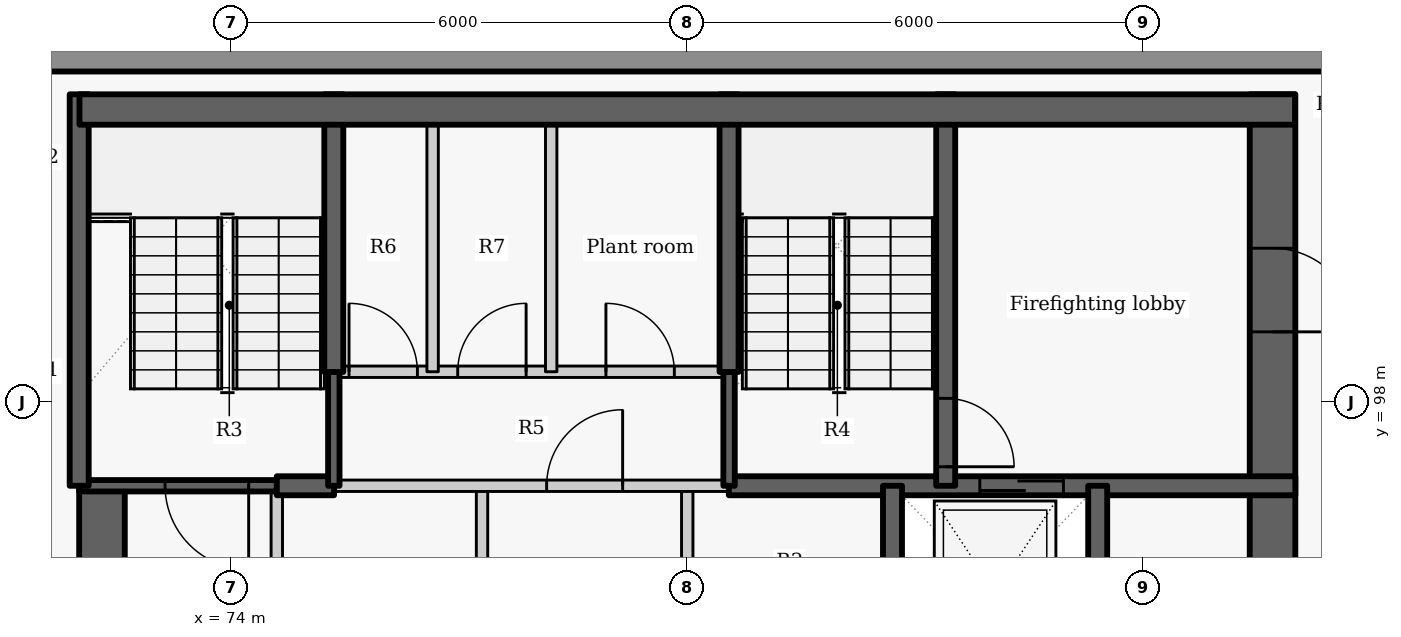
"""IFC4 building model, lengths in metres.
Left out: names, types, materials, properties, quantities, classifications, styles, units other than length and angle.
Written with IfcOpenShell. Run it as: python <this file> out.ifc"""

import sys

from ifc_helpers import new_model, si_unit, direction, frame, frame_2d, origin, place, context, subcontext, project, spatial, rectangle, extrude, element, fill, save


model = new_model("IFC4")
c1 = context("Model", 3, precision=1e-05, world=origin(), true_north=direction((0.0, 1.0)))
c2 = subcontext(c1, "Body", "Model", "MODEL_VIEW")
j1 = project(units=[si_unit("LENGTHUNIT", "METRE"), si_unit("PLANEANGLEUNIT", "RADIAN")], contexts=[c1])
p1 = place(None, origin())
s1 = spatial("IfcSite", under=j1, at=p1, CompositionType="ELEMENT")
p2 = place(p1, origin())
s2 = spatial("IfcBuilding", under=s1, at=p2, CompositionType="ELEMENT")
p3 = place(p2, frame((0.0, 0.0, 276.0)))
s3 = spatial("IfcBuildingStorey", under=s2, at=p3, CompositionType="ELEMENT", Elevation=276.0)
p4 = place(p3, frame((89.549, 102.5, 0.0), z_axis=(0.0, 0.0, 1.0), x_axis=(-1.0, 0.0, 0.0)))
e1 = element("IfcWall", 1, at=p4, inside=s3, PredefinedType="SOLIDWALL", context=c2, shape_type="SweptSolid", body=[
    extrude(rectangle(XDim=19.134, YDim=0.3, at=frame_2d((9.567, 0.0))), origin(), (0.0, 0.0, 1.0), 2.725),
])
p5 = place(p3, frame((74.6, 94.1, 0.0), z_axis=(0.0, 0.0, 1.0), x_axis=(0.0, 1.0, 0.0)))
e2 = element("IfcWall", 2, at=p5, inside=s3, PredefinedType="PARTITIONING", context=c2, shape_type="SweptSolid", body=[
    extrude(rectangle(XDim=2.8, YDim=0.15, at=frame_2d((1.4, 0.0))), origin(), (0.0, 0.0, 1.0), 3.325),
])
p6 = place(p3, frame((72.3, 87.8, -0.275), z_axis=(0.0, 0.0, 1.0), x_axis=(0.0, 1.0, 0.0)))
e3 = element("IfcWall", 3, at=p6, inside=s3, PredefinedType="SHEAR", context=c2, shape_type="SweptSolid", body=[
    extrude(rectangle(XDim=9.1, YDim=0.6, at=frame_2d((4.55, 0.0))), origin(), (0.0, 0.0, 1.0), 3.6),
])
p7 = place(p6, frame((3.85, 0.0, 0.275)))
e4 = element("IfcOpeningElement", 4, at=p7, cuts=e3, PredefinedType="OPENING", context=c2, shape_type="SweptSolid", body=[
    extrude(rectangle(XDim=1.5, YDim=2.1, at=frame_2d((0.75, 1.05))), frame((0.0, 0.31, 0.0), z_axis=(0.0, -1.0, 0.0), x_axis=(1.0, 0.0, 0.0)), (0.0, 0.0, 1.0), 0.62),
])
for number, where, z_axis, x_axis in (
    (5, (77.3, 94.1, 0.0), (0.0, 0.0, 1.0), (0.0, 1.0, 0.0)),
    (6, (80.0, 94.1, 0.0), (0.0, 0.0, 1.0), (0.0, 1.0, 0.0)),
):
    element("IfcWall", number, at=place(p3, frame(where, z_axis=z_axis, x_axis=x_axis)), inside=s3, PredefinedType="PARTITIONING", context=c2, shape_type="SweptSolid", body=[
        extrude(rectangle(XDim=2.8, YDim=0.15, at=frame_2d((1.4, 0.0))), origin(), (0.0, 0.0, 1.0), 3.325),
    ])
p8 = place(p3, frame((87.7, 102.05, -0.275), z_axis=(0.0, 0.0, 1.0), x_axis=(0.0, -1.0, 0.0)))
e7 = element("IfcWall", 7, at=p8, inside=s3, PredefinedType="SHEAR", context=c2, shape_type="SweptSolid", body=[
    extrude(rectangle(XDim=11.35, YDim=0.6, at=frame_2d((5.675, 0.0))), origin(), (0.0, 0.0, 1.0), 3.6),
])
p9 = place(p8, frame((8.9, 0.0, 0.275)))
e8 = element("IfcOpeningElement", 8, at=p9, cuts=e7, PredefinedType="OPENING", context=c2, shape_type="SweptSolid", body=[
    extrude(rectangle(XDim=1.5, YDim=2.1, at=frame_2d((0.75, 1.05))), frame((0.0, 0.31, 0.0), z_axis=(0.0, -1.0, 0.0), x_axis=(1.0, 0.0, 0.0)), (0.0, 0.0, 1.0), 0.62),
])
p10 = place(p8, frame((2.025, 0.0, 0.275)))
e9 = element("IfcOpeningElement", 9, at=p10, cuts=e7, PredefinedType="OPENING", context=c2, shape_type="SweptSolid", body=[
    extrude(rectangle(XDim=1.1, YDim=2.1, at=frame_2d((0.55, 1.05))), frame((0.0, 0.31, 0.0), z_axis=(0.0, -1.0, 0.0), x_axis=(1.0, 0.0, 0.0)), (0.0, 0.0, 1.0), 0.62),
])
p11 = place(p3, frame((74.6, 96.9, -0.275), z_axis=(0.0, 0.0, 1.0), x_axis=(-1.0, 0.0, 0.0)))
e10 = element("IfcWall", 10, at=p11, inside=s3, PredefinedType="SHEAR", context=c2, shape_type="SweptSolid", body=[
    extrude(rectangle(XDim=2.6, YDim=0.15, at=frame_2d((1.3, 0.0))), origin(), (0.0, 0.0, 1.0), 3.6),
])
p12 = place(p11, frame((0.37, 0.0, 0.275)))
e11 = element("IfcOpeningElement", 11, at=p12, cuts=e10, PredefinedType="OPENING", context=c2, shape_type="SweptSolid", body=[
    extrude(rectangle(XDim=1.1, YDim=2.1, at=frame_2d((0.55, 1.05))), frame((0.0, 0.085, 0.0), z_axis=(0.0, -1.0, 0.0), x_axis=(1.0, 0.0, 0.0)), (0.0, 0.0, 1.0), 0.17),
])
p13 = place(p3, frame((74.6, 96.9, -0.275), z_axis=(0.0, 0.0, 1.0), x_axis=(1.0, 0.0, 0.0)))
e12 = element("IfcWall", 12, at=p13, inside=s3, PredefinedType="SHEAR", context=c2, shape_type="SweptSolid", body=[
    extrude(rectangle(XDim=0.753, YDim=0.25, at=frame_2d((0.376, 0.0))), origin(), (0.0, 0.0, 1.0), 3.6),
])
p14 = place(p3, frame((80.547, 96.9, -0.275), z_axis=(0.0, 0.0, 1.0), x_axis=(1.0, 0.0, 0.0)))
e13 = element("IfcWall", 13, at=p14, inside=s3, PredefinedType="SHEAR", context=c2, shape_type="SweptSolid", body=[
    extrude(rectangle(XDim=7.453, YDim=0.25, at=frame_2d((3.727, 0.0))), origin(), (0.0, 0.0, 1.0), 3.6),
])
p15 = place(p14, frame((3.302, 0.0, 0.275)))
e14 = element("IfcOpeningElement", 14, at=p15, cuts=e13, PredefinedType="OPENING", context=c2, shape_type="SweptSolid", body=[
    extrude(rectangle(XDim=1.1, YDim=2.1, at=frame_2d((0.55, 1.05))), frame((0.0, 0.135, 0.0), z_axis=(0.0, -1.0, 0.0), x_axis=(1.0, 0.0, 0.0)), (0.0, 0.0, 1.0), 0.27),
])
p16 = place(p3, frame((75.347, 96.9, 0.0), z_axis=(0.0, 0.0, 1.0), x_axis=(1.0, 0.0, 0.0)))
e15 = element("IfcWall", 15, at=p16, inside=s3, PredefinedType="PARTITIONING", context=c2, shape_type="SweptSolid", body=[
    extrude(rectangle(XDim=5.206, YDim=0.15, at=frame_2d((2.603, 0.0))), origin(), (0.0, 0.0, 1.0), 3.325),
])
p17 = place(p16, frame((2.803, 0.0, 0.0)))
e16 = element("IfcOpeningElement", 16, at=p17, cuts=e15, PredefinedType="OPENING", context=c2, shape_type="SweptSolid", body=[
    extrude(rectangle(XDim=1.0, YDim=2.1, at=frame_2d((0.5, 1.05))), frame((0.0, 0.085, 0.0), z_axis=(0.0, -1.0, 0.0), x_axis=(1.0, 0.0, 0.0)), (0.0, 0.0, 1.0), 0.17),
])
for number, where, z_axis, x_axis in (
    (17, (82.7, 94.1, -0.275), (0.0, 0.0, 1.0), (0.0, 1.0, 0.0)),
    (18, (85.4, 94.1, -0.275), (0.0, 0.0, 1.0), (0.0, 1.0, 0.0)),
):
    element("IfcWall", number, at=place(p3, frame(where, z_axis=z_axis, x_axis=x_axis)), inside=s3, PredefinedType="SHEAR", context=c2, shape_type="SweptSolid", body=[
        extrude(rectangle(XDim=2.8, YDim=0.25, at=frame_2d((1.4, 0.0))), origin(), (0.0, 0.0, 1.0), 3.6),
    ])
p18 = place(p3, frame((75.35, 96.9, -0.275), z_axis=(0.0, 0.0, 1.0), x_axis=(0.0, 1.0, 0.0)))
e19 = element("IfcWall", 19, at=p18, inside=s3, PredefinedType="SHEAR", context=c2, shape_type="SweptSolid", body=[
    extrude(rectangle(XDim=1.503, YDim=0.15, at=frame_2d((0.751, 0.0))), origin(), (0.0, 0.0, 1.0), 3.6),
])
p19 = place(p3, frame((75.35, 98.397, -0.275), z_axis=(0.0, 0.0, 1.0), x_axis=(0.0, 1.0, 0.0)))
e20 = element("IfcWall", 20, at=p19, inside=s3, PredefinedType="SHEAR", context=c2, shape_type="SweptSolid", body=[
    extrude(rectangle(XDim=3.653, YDim=0.25, at=frame_2d((1.827, 0.0))), origin(), (0.0, 0.0, 1.0), 3.6),
])
p20 = place(p3, frame((72.0, 96.9, -0.275), z_axis=(0.0, 0.0, 1.0), x_axis=(0.0, 1.0, 0.0)))
e21 = element("IfcWall", 21, at=p20, inside=s3, PredefinedType="SHEAR", context=c2, shape_type="SweptSolid", body=[
    extrude(rectangle(XDim=5.15, YDim=0.25, at=frame_2d((2.575, 0.0))), origin(), (0.0, 0.0, 1.0), 3.6),
])
p21 = place(p3, frame((83.4, 102.05, -0.275), z_axis=(0.0, 0.0, 1.0), x_axis=(0.0, -1.0, 0.0)))
e22 = element("IfcWall", 22, at=p21, inside=s3, PredefinedType="SHEAR", context=c2, shape_type="SweptSolid", body=[
    extrude(rectangle(XDim=5.15, YDim=0.25, at=frame_2d((2.575, 0.0))), origin(), (0.0, 0.0, 1.0), 3.6),
])
p22 = place(p21, frame((4.0, 0.0, 0.275)))
e23 = element("IfcOpeningElement", 23, at=p22, cuts=e22, PredefinedType="OPENING", context=c2, shape_type="SweptSolid", body=[
    extrude(rectangle(XDim=0.9, YDim=2.1, at=frame_2d((0.45, 1.05))), frame((0.0, 0.135, 0.0), z_axis=(0.0, -1.0, 0.0), x_axis=(1.0, 0.0, 0.0)), (0.0, 0.0, 1.0), 0.27),
])
p23 = place(p3, frame((80.55, 96.9, -0.275), z_axis=(0.0, 0.0, 1.0), x_axis=(0.0, 1.0, 0.0)))
e24 = element("IfcWall", 24, at=p23, inside=s3, PredefinedType="SHEAR", context=c2, shape_type="SweptSolid", body=[
    extrude(rectangle(XDim=1.503, YDim=0.15, at=frame_2d((0.751, 0.0))), origin(), (0.0, 0.0, 1.0), 3.6),
])
p24 = place(p3, frame((80.55, 98.397, -0.275), z_axis=(0.0, 0.0, 1.0), x_axis=(0.0, 1.0, 0.0)))
e25 = element("IfcWall", 25, at=p24, inside=s3, PredefinedType="SHEAR", context=c2, shape_type="SweptSolid", body=[
    extrude(rectangle(XDim=3.653, YDim=0.25, at=frame_2d((1.827, 0.0))), origin(), (0.0, 0.0, 1.0), 3.6),
])
p25 = place(p3, frame((75.35, 98.4, 0.0), z_axis=(0.0, 0.0, 1.0), x_axis=(1.0, 0.0, 0.0)))
e26 = element("IfcWall", 26, at=p25, inside=s3, PredefinedType="PARTITIONING", context=c2, shape_type="SweptSolid", body=[
    extrude(rectangle(XDim=5.2, YDim=0.15, at=frame_2d((2.6, 0.0))), origin(), (0.0, 0.0, 1.0), 3.325),
])
p26 = place(p25, frame((0.2, 0.0, 0.0)))
e27 = element("IfcOpeningElement", 27, at=p26, cuts=e26, PredefinedType="OPENING", context=c2, shape_type="SweptSolid", body=[
    extrude(rectangle(XDim=0.9, YDim=2.1, at=frame_2d((0.45, 1.05))), frame((0.0, 0.085, 0.0), z_axis=(0.0, -1.0, 0.0), x_axis=(1.0, 0.0, 0.0)), (0.0, 0.0, 1.0), 0.17),
])
p27 = place(p25, frame((1.63, 0.0, 0.0)))
e28 = element("IfcOpeningElement", 28, at=p27, cuts=e26, PredefinedType="OPENING", context=c2, shape_type="SweptSolid", body=[
    extrude(rectangle(XDim=0.9, YDim=2.1, at=frame_2d((0.45, 1.05))), frame((0.0, 0.085, 0.0), z_axis=(0.0, -1.0, 0.0), x_axis=(1.0, 0.0, 0.0)), (0.0, 0.0, 1.0), 0.17),
])
p28 = place(p25, frame((3.58, 0.0, 0.0)))
e29 = element("IfcOpeningElement", 29, at=p28, cuts=e26, PredefinedType="OPENING", context=c2, shape_type="SweptSolid", body=[
    extrude(rectangle(XDim=0.9, YDim=2.1, at=frame_2d((0.45, 1.05))), frame((0.0, 0.085, 0.0), z_axis=(0.0, -1.0, 0.0), x_axis=(1.0, 0.0, 0.0)), (0.0, 0.0, 1.0), 0.17),
])
for number, where, z_axis, x_axis in (
    (30, (76.65, 98.4, 0.0), (0.0, 0.0, 1.0), (0.0, 1.0, 0.0)),
    (31, (78.21, 98.4, 0.0), (0.0, 0.0, 1.0), (0.0, 1.0, 0.0)),
):
    element("IfcWall", number, at=place(p3, frame(where, z_axis=z_axis, x_axis=x_axis)), inside=s3, PredefinedType="PARTITIONING", context=c2, shape_type="SweptSolid", body=[
        extrude(rectangle(XDim=3.65, YDim=0.15, at=frame_2d((1.825, 0.0))), origin(), (0.0, 0.0, 1.0), 3.325),
    ])
p29 = place(p3, frame((72.004, 101.85, -0.275), z_axis=(0.0, 0.0, 1.0), x_axis=(1.0, 0.0, 0.0)))
e32 = element("IfcWall", 32, at=p29, inside=s3, PredefinedType="SHEAR", context=c2, shape_type="SweptSolid", body=[
    extrude(rectangle(XDim=15.992, YDim=0.4, at=frame_2d((7.996, 0.0))), origin(), (0.0, 0.0, 1.0), 3.6),
])
p30 = place(p15, origin())
e33 = element("IfcDoor", 33, at=p30, inside=s3, OperationType="SLIDING_TO_LEFT", PredefinedType="DOOR", context=c2, shape_type="SweptSolid", body=[
    extrude(rectangle(XDim=1.1, YDim=2.1, at=frame_2d((0.55, 1.05))), frame((0.0, 0.025, 0.0), z_axis=(0.0, -1.0, 0.0), x_axis=(1.0, 0.0, 0.0)), (0.0, 0.0, 1.0), 0.05),
])
fill(e14, e33)
p31 = place(p17, origin())
e34 = element("IfcDoor", 34, at=p31, inside=s3, OperationType="SINGLE_SWING_RIGHT", PredefinedType="DOOR", context=c2, shape_type="SweptSolid", body=[
    extrude(rectangle(XDim=1.0, YDim=2.1, at=frame_2d((0.5, 1.05))), frame((0.0, 0.025, 0.0), z_axis=(0.0, -1.0, 0.0), x_axis=(1.0, 0.0, 0.0)), (0.0, 0.0, 1.0), 0.05),
])
fill(e16, e34)
p32 = place(p26, origin())
e35 = element("IfcDoor", 35, at=p32, inside=s3, OperationType="SINGLE_SWING_LEFT", PredefinedType="DOOR", context=c2, shape_type="SweptSolid", body=[
    extrude(rectangle(XDim=0.9, YDim=2.1, at=frame_2d((0.45, 1.05))), frame((0.0, 0.025, 0.0), z_axis=(0.0, -1.0, 0.0), x_axis=(1.0, 0.0, 0.0)), (0.0, 0.0, 1.0), 0.05),
])
fill(e27, e35)
p33 = place(p27, origin())
e36 = element("IfcDoor", 36, at=p33, inside=s3, OperationType="SINGLE_SWING_RIGHT", PredefinedType="DOOR", context=c2, shape_type="SweptSolid", body=[
    extrude(rectangle(XDim=0.9, YDim=2.1, at=frame_2d((0.45, 1.05))), frame((0.0, 0.025, 0.0), z_axis=(0.0, -1.0, 0.0), x_axis=(1.0, 0.0, 0.0)), (0.0, 0.0, 1.0), 0.05),
])
fill(e28, e36)
p34 = place(p28, origin())
e37 = element("IfcDoor", 37, at=p34, inside=s3, OperationType="SINGLE_SWING_LEFT", PredefinedType="DOOR", context=c2, shape_type="SweptSolid", body=[
    extrude(rectangle(XDim=0.9, YDim=2.1, at=frame_2d((0.45, 1.05))), frame((0.0, 0.025, 0.0), z_axis=(0.0, -1.0, 0.0), x_axis=(1.0, 0.0, 0.0)), (0.0, 0.0, 1.0), 0.05),
])
fill(e29, e37)
p35 = place(p12, origin())
e38 = element("IfcDoor", 38, at=p35, inside=s3, OperationType="SINGLE_SWING_LEFT", PredefinedType="DOOR", context=c2, shape_type="SweptSolid", body=[
    extrude(rectangle(XDim=1.1, YDim=2.1, at=frame_2d((0.55, 1.05))), frame((0.0, 0.025, 0.0), z_axis=(0.0, -1.0, 0.0), x_axis=(1.0, 0.0, 0.0)), (0.0, 0.0, 1.0), 0.05),
])
fill(e11, e38)
p36 = place(p22, origin())
e39 = element("IfcDoor", 39, at=p36, inside=s3, OperationType="SINGLE_SWING_RIGHT", PredefinedType="DOOR", context=c2, shape_type="SweptSolid", body=[
    extrude(rectangle(XDim=0.9, YDim=2.1, at=frame_2d((0.45, 1.05))), frame((0.0, 0.025, 0.0), z_axis=(0.0, -1.0, 0.0), x_axis=(1.0, 0.0, 0.0)), (0.0, 0.0, 1.0), 0.05),
])
fill(e23, e39)
p37 = place(p10, origin())
e40 = element("IfcDoor", 40, at=p37, inside=s3, OperationType="SINGLE_SWING_RIGHT", PredefinedType="DOOR", context=c2, shape_type="SweptSolid", body=[
    extrude(rectangle(XDim=1.1, YDim=2.1, at=frame_2d((0.55, 1.05))), frame((0.0, 0.025, 0.0), z_axis=(0.0, -1.0, 0.0), x_axis=(1.0, 0.0, 0.0)), (0.0, 0.0, 1.0), 0.05),
])
fill(e9, e40)
save(model, sys.argv[1])
